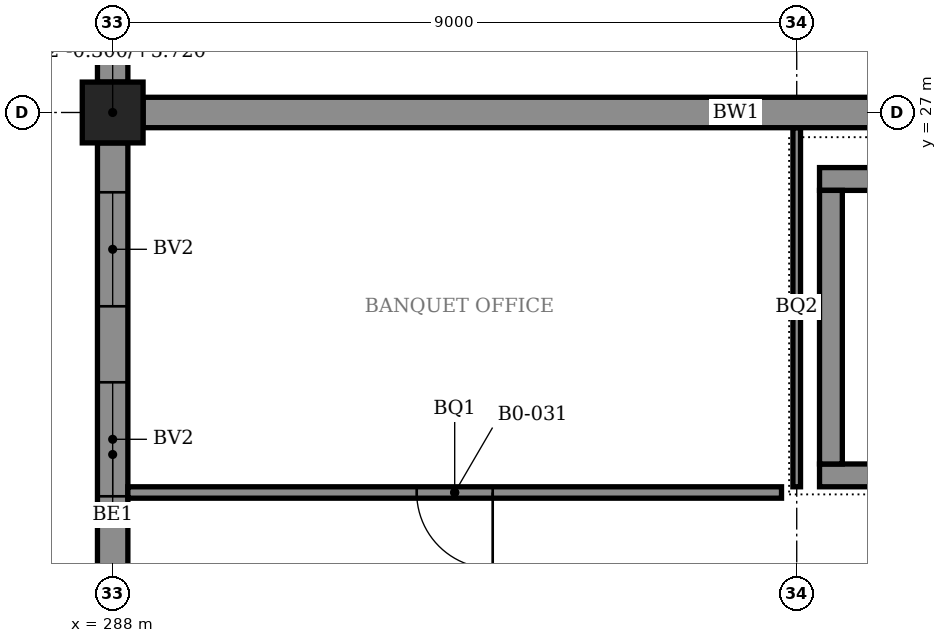
"""IFC4 building model, lengths in metres.
Left out: names, types, materials, properties, quantities, classifications, styles, units other than length and angle.
Written with IfcOpenShell. Run it as: python <this file> out.ifc"""

import sys

from ifc_helpers import new_model, si_unit, direction, frame, frame_2d, origin, origin_2d, place, context, subcontext, project, spatial, polyline, rectangle, outline, extrude, element, fill, save


model = new_model("IFC4")
c1 = context("Model", 3, precision=1e-05, world=origin(), true_north=direction((0.0, 1.0)))
c2 = subcontext(c1, "Body", "Model", "MODEL_VIEW")
j1 = project(units=[si_unit("LENGTHUNIT", "METRE"), si_unit("PLANEANGLEUNIT", "RADIAN")], contexts=[c1])
p1 = place(None, origin())
s1 = spatial("IfcSite", under=j1, at=p1, CompositionType="ELEMENT")
p2 = place(p1, origin())
s2 = spatial("IfcBuilding", under=s1, at=p2, CompositionType="ELEMENT")
p3 = place(p2, origin())
s3 = spatial("IfcBuildingStorey", under=s2, at=p3, CompositionType="ELEMENT", Elevation=0.0)
p4 = place(p3, frame((288.0, 27.0, -0.3), z_axis=(0.0, 0.0, 1.0), x_axis=(1.0, 0.0, 0.0)))
e1 = element("IfcColumn", 1, at=p4, inside=s3, PredefinedType="COLUMN", context=c2, shape_type="SweptSolid", body=[
    extrude(rectangle(XDim=0.8, YDim=0.8, at=origin_2d()), origin(), (0.0, 0.0, 1.0), 6.02),
])
p5 = place(p3, frame((288.4, 27.0, -0.3), z_axis=(0.0, 0.0, 1.0), x_axis=(1.0, 0.0, 0.0)))
e2 = element("IfcWall", 2, at=p5, inside=s3, PredefinedType="SHEAR", context=c2, shape_type="SweptSolid", body=[
    extrude(rectangle(XDim=62.2, YDim=0.4, at=frame_2d((31.1, 0.0))), origin(), (0.0, 0.0, 1.0), 10.625),
])
p6 = place(p5, frame((22.4, 0.0, 0.3)))
e3 = element("IfcOpeningElement", 3, at=p6, cuts=e2, PredefinedType="OPENING", context=c2, shape_type="SweptSolid", body=[
    extrude(rectangle(XDim=2.4, YDim=2.4, at=frame_2d((1.2, 1.2))), frame((0.0, 0.21, 0.0), z_axis=(0.0, -1.0, 0.0), x_axis=(1.0, 0.0, 0.0)), (0.0, 0.0, 1.0), 0.42),
])
p7 = place(p5, frame((38.9, 0.0, 0.3)))
e4 = element("IfcOpeningElement", 4, at=p7, cuts=e2, PredefinedType="OPENING", context=c2, shape_type="SweptSolid", body=[
    extrude(rectangle(XDim=2.4, YDim=2.4, at=frame_2d((1.2, 1.2))), frame((0.0, 0.21, 0.0), z_axis=(0.0, -1.0, 0.0), x_axis=(1.0, 0.0, 0.0)), (0.0, 0.0, 1.0), 0.42),
])
p8 = place(p3, frame((288.0, 27.4, 0.0), z_axis=(0.0, 0.0, 1.0), x_axis=(0.0, 1.0, 0.0)))
e5 = element("IfcWall", 5, at=p8, inside=s3, PredefinedType="STANDARD", context=c2, shape_type="SweptSolid", body=[
    extrude(outline(polyline([(0.0, 0.0), (35.2, 0.0), (35.2, 9.75), (35.5, 9.75), (35.5, 17.708), (0.0, 11.448), (0.0, 0.0)])), frame((0.0, 0.2, 0.0), z_axis=(0.0, -1.0, 0.0), x_axis=(1.0, 0.0, 0.0)), (0.0, 0.0, 1.0), 0.4),
])
p9 = place(p8, frame((2.75, 0.0, 0.0)))
e6 = element("IfcOpeningElement", 6, at=p9, cuts=e5, PredefinedType="OPENING", context=c2, shape_type="SweptSolid", body=[
    extrude(rectangle(XDim=2.7, YDim=2.4, at=frame_2d((1.35, 1.2))), frame((0.0, 0.21, 0.0), z_axis=(0.0, -1.0, 0.0), x_axis=(1.0, 0.0, 0.0)), (0.0, 0.0, 1.0), 0.42),
])
p10 = place(p8, frame((11.75, 0.0, 0.0)))
e7 = element("IfcOpeningElement", 7, at=p10, cuts=e5, PredefinedType="OPENING", context=c2, shape_type="SweptSolid", body=[
    extrude(rectangle(XDim=2.7, YDim=2.4, at=frame_2d((1.35, 1.2))), frame((0.0, 0.21, 0.0), z_axis=(0.0, -1.0, 0.0), x_axis=(1.0, 0.0, 0.0)), (0.0, 0.0, 1.0), 0.42),
])
p11 = place(p8, frame((20.75, 0.0, 0.0)))
e8 = element("IfcOpeningElement", 8, at=p11, cuts=e5, PredefinedType="OPENING", context=c2, shape_type="SweptSolid", body=[
    extrude(rectangle(XDim=2.7, YDim=2.4, at=frame_2d((1.35, 1.2))), frame((0.0, 0.21, 0.0), z_axis=(0.0, -1.0, 0.0), x_axis=(1.0, 0.0, 0.0)), (0.0, 0.0, 1.0), 0.42),
])
p12 = place(p8, frame((29.75, 0.0, 0.0)))
e9 = element("IfcOpeningElement", 9, at=p12, cuts=e5, PredefinedType="OPENING", context=c2, shape_type="SweptSolid", body=[
    extrude(rectangle(XDim=2.7, YDim=2.4, at=frame_2d((1.35, 1.2))), frame((0.0, 0.21, 0.0), z_axis=(0.0, -1.0, 0.0), x_axis=(1.0, 0.0, 0.0)), (0.0, 0.0, 1.0), 0.42),
])
p13 = place(p3, frame((288.0, 18.4, 0.0), z_axis=(0.0, 0.0, 1.0), x_axis=(0.0, 1.0, 0.0)))
e10 = element("IfcWall", 10, at=p13, inside=s3, PredefinedType="STANDARD", context=c2, shape_type="SweptSolid", body=[
    extrude(rectangle(XDim=8.2, YDim=0.4, at=frame_2d((4.1, 0.0))), origin(), (0.0, 0.0, 1.0), 5.02),
])
p14 = place(p13, frame((1.05, 0.0, 0.9)))
e11 = element("IfcOpeningElement", 11, at=p14, cuts=e10, PredefinedType="OPENING", context=c2, shape_type="SweptSolid", body=[
    extrude(rectangle(XDim=1.5, YDim=1.8, at=frame_2d((0.75, 0.9))), frame((0.0, 0.21, 0.0), z_axis=(0.0, -1.0, 0.0), x_axis=(1.0, 0.0, 0.0)), (0.0, 0.0, 1.0), 0.42),
])
p15 = place(p13, frame((3.55, 0.0, 0.9)))
e12 = element("IfcOpeningElement", 12, at=p15, cuts=e10, PredefinedType="OPENING", context=c2, shape_type="SweptSolid", body=[
    extrude(rectangle(XDim=1.5, YDim=1.8, at=frame_2d((0.75, 0.9))), frame((0.0, 0.21, 0.0), z_axis=(0.0, -1.0, 0.0), x_axis=(1.0, 0.0, 0.0)), (0.0, 0.0, 1.0), 0.42),
])
p16 = place(p13, frame((6.05, 0.0, 0.9)))
e13 = element("IfcOpeningElement", 13, at=p16, cuts=e10, PredefinedType="OPENING", context=c2, shape_type="SweptSolid", body=[
    extrude(rectangle(XDim=1.5, YDim=1.8, at=frame_2d((0.75, 0.9))), frame((0.0, 0.21, 0.0), z_axis=(0.0, -1.0, 0.0), x_axis=(1.0, 0.0, 0.0)), (0.0, 0.0, 1.0), 0.42),
])
p17 = place(p3, frame((288.2, 22.0, 0.0), z_axis=(0.0, 0.0, 1.0), x_axis=(1.0, 0.0, 0.0)))
e14 = element("IfcWall", 14, at=p17, inside=s3, PredefinedType="PARTITIONING", context=c2, shape_type="SweptSolid", body=[
    extrude(rectangle(XDim=8.6, YDim=0.15, at=frame_2d((4.3, 0.0))), origin(), (0.0, 0.0, 1.0), 5.72),
])
p18 = place(p17, frame((3.8, 0.0, 0.0)))
e15 = element("IfcOpeningElement", 15, at=p18, cuts=e14, PredefinedType="OPENING", context=c2, shape_type="SweptSolid", body=[
    extrude(rectangle(XDim=1.0, YDim=2.4, at=frame_2d((0.5, 1.2))), frame((0.0, 0.085, 0.0), z_axis=(0.0, -1.0, 0.0), x_axis=(1.0, 0.0, 0.0)), (0.0, 0.0, 1.0), 0.17),
])
p19 = place(p3, frame((297.0, 22.075, 0.0), z_axis=(0.0, 0.0, 1.0), x_axis=(0.0, 1.0, 0.0)))
e16 = element("IfcWall", 16, at=p19, inside=s3, PredefinedType="PARTITIONING", context=c2, shape_type="SweptSolid", body=[
    extrude(rectangle(XDim=4.725, YDim=0.1, at=frame_2d((2.363, 0.0))), origin(), (0.0, 0.0, 1.0), 5.02),
])
p20 = place(p3, frame((297.3, 22.225, -1.5), z_axis=(0.0, 0.0, 1.0), x_axis=(1.0, 0.0, 0.0)))
e17 = element("IfcWall", 17, at=p20, inside=s3, PredefinedType="SHEAR", context=c2, shape_type="SweptSolid", body=[
    extrude(rectangle(XDim=3.6, YDim=0.3, at=frame_2d((1.8, 0.0))), origin(), (0.0, 0.0, 1.0), 7.5),
])
p21 = place(p20, frame((0.9, 0.0, 1.5)))
e18 = element("IfcOpeningElement", 18, at=p21, cuts=e17, PredefinedType="OPENING", context=c2, shape_type="SweptSolid", body=[
    extrude(rectangle(XDim=1.8, YDim=2.1, at=frame_2d((0.9, 1.05))), frame((0.0, 0.16, 0.0), z_axis=(0.0, -1.0, 0.0), x_axis=(1.0, 0.0, 0.0)), (0.0, 0.0, 1.0), 0.32),
])
p22 = place(p3, frame((297.3, 26.125, -1.5), z_axis=(0.0, 0.0, 1.0), x_axis=(1.0, 0.0, 0.0)))
e19 = element("IfcWall", 19, at=p22, inside=s3, PredefinedType="SHEAR", context=c2, shape_type="SweptSolid", body=[
    extrude(rectangle(XDim=3.6, YDim=0.3, at=frame_2d((1.8, 0.0))), origin(), (0.0, 0.0, 1.0), 7.5),
])
p23 = place(p3, frame((297.45, 22.375, -1.5), z_axis=(0.0, 0.0, 1.0), x_axis=(0.0, 1.0, 0.0)))
e20 = element("IfcWall", 20, at=p23, inside=s3, PredefinedType="SHEAR", context=c2, shape_type="SweptSolid", body=[
    extrude(rectangle(XDim=3.6, YDim=0.3, at=frame_2d((1.8, 0.0))), origin(), (0.0, 0.0, 1.0), 7.5),
])
p24 = place(p15, origin())
e21 = element("IfcWindow", 21, at=p24, inside=s3, PartitioningType="SINGLE_PANEL", PredefinedType="WINDOW", context=c2, shape_type="SweptSolid", body=[
    extrude(rectangle(XDim=1.5, YDim=1.8, at=frame_2d((0.75, 0.9))), frame((0.0, 0.03, 0.0), z_axis=(0.0, -1.0, 0.0), x_axis=(1.0, 0.0, 0.0)), (0.0, 0.0, 1.0), 0.06),
])
fill(e12, e21)
p25 = place(p16, origin())
e22 = element("IfcWindow", 22, at=p25, inside=s3, PartitioningType="SINGLE_PANEL", PredefinedType="WINDOW", context=c2, shape_type="SweptSolid", body=[
    extrude(rectangle(XDim=1.5, YDim=1.8, at=frame_2d((0.75, 0.9))), frame((0.0, 0.03, 0.0), z_axis=(0.0, -1.0, 0.0), x_axis=(1.0, 0.0, 0.0)), (0.0, 0.0, 1.0), 0.06),
])
fill(e13, e22)
p26 = place(p18, frame((1.0, 0.0, 0.0), z_axis=(0.0, 0.0, 1.0), x_axis=(-1.0, 0.0, 0.0)))
e23 = element("IfcDoor", 23, at=p26, inside=s3, OperationType="SINGLE_SWING_RIGHT", PredefinedType="DOOR", context=c2, shape_type="SweptSolid", body=[
    extrude(rectangle(XDim=1.0, YDim=2.4, at=frame_2d((0.5, 1.2))), frame((0.0, 0.025, 0.0), z_axis=(0.0, -1.0, 0.0), x_axis=(1.0, 0.0, 0.0)), (0.0, 0.0, 1.0), 0.05),
])
fill(e15, e23)
save(model, sys.argv[1])
